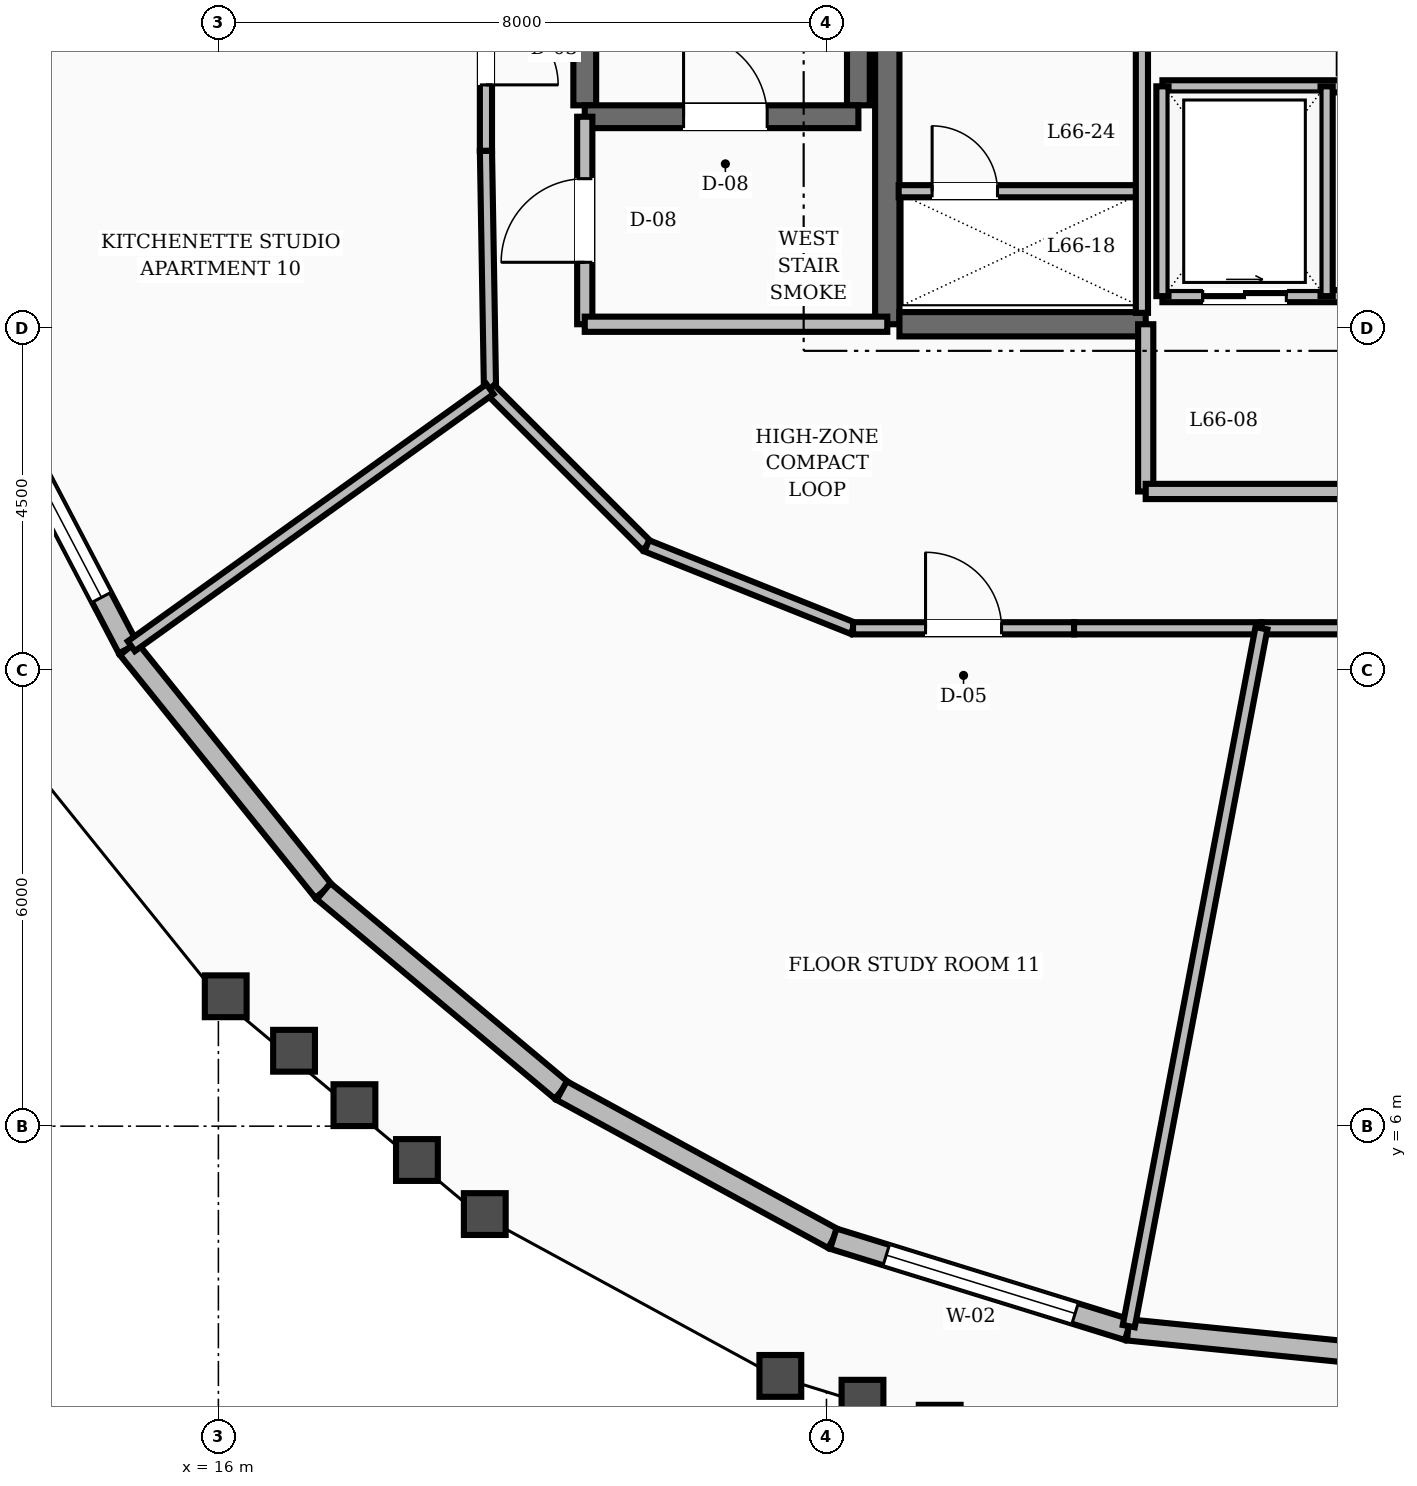
"""IFC4 building model, lengths in metres.
Left out: names, types, materials, properties, quantities, classifications, styles, units other than length and angle.
Written with IfcOpenShell. Run it as: python <this file> out.ifc"""

import sys

from ifc_helpers import new_model, si_unit, direction, frame, frame_2d, origin, place, context, subcontext, project, spatial, rectangle, extrude, element, fill, save


model = new_model("IFC4")
c1 = context("Model", 3, precision=1e-05, world=origin(), true_north=direction((0.0, 1.0)))
c2 = subcontext(c1, "Body", "Model", "MODEL_VIEW")
j1 = project(units=[si_unit("LENGTHUNIT", "METRE"), si_unit("PLANEANGLEUNIT", "RADIAN")], contexts=[c1])
p1 = place(None, origin())
s1 = spatial("IfcSite", under=j1, at=p1, CompositionType="ELEMENT")
p2 = place(p1, origin())
s2 = spatial("IfcBuilding", under=s1, at=p2, CompositionType="ELEMENT")
p3 = place(p2, frame((0.0, 0.0, 254.4)))
s3 = spatial("IfcBuildingStorey", under=s2, at=p3, CompositionType="ELEMENT", Elevation=254.4)
p4 = place(p3, frame((24.8, 16.55, 0.0), z_axis=(0.0, 0.0, 1.0), x_axis=(0.0, 1.0, 0.0)))
e1 = element("IfcWall", 1, at=p4, inside=s3, PredefinedType="SHEAR", context=c2, shape_type="SweptSolid", body=[
    extrude(rectangle(XDim=6.3, YDim=0.32, at=frame_2d((3.15, 0.0))), origin(), (0.0, 0.0, 1.0), 3.6),
])
p5 = place(p3, frame((24.96, 16.55, 0.0), z_axis=(0.0, 0.0, 1.0), x_axis=(1.0, 0.0, 0.0)))
e2 = element("IfcWall", 2, at=p5, inside=s3, PredefinedType="SHEAR", context=c2, shape_type="SweptSolid", body=[
    extrude(rectangle(XDim=3.24, YDim=0.32, at=frame_2d((1.62, 0.0))), origin(), (0.0, 0.0, 1.0), 3.6),
])
for number, where, z_axis, x_axis in (
    (3, (20.82, 19.43, 0.0), (0.0, 0.0, 1.0), (0.0, 1.0, 0.0)),
    (4, (24.42, 19.43, 0.0), (0.0, 0.0, 1.0), (0.0, 1.0, 0.0)),
):
    element("IfcWall", number, at=place(p3, frame(where, z_axis=z_axis, x_axis=x_axis)), inside=s3, PredefinedType="SHEAR", context=c2, shape_type="SweptSolid", body=[
        extrude(rectangle(XDim=8.74, YDim=0.3, at=frame_2d((4.37, 0.0))), origin(), (0.0, 0.0, 1.0), 3.6),
    ])
p6 = place(p3, frame((20.82, 19.28, 0.0), z_axis=(0.0, 0.0, 1.0), x_axis=(1.0, 0.0, 0.0)))
e5 = element("IfcWall", 5, at=p6, inside=s3, PredefinedType="SHEAR", context=c2, shape_type="SweptSolid", body=[
    extrude(rectangle(XDim=3.6, YDim=0.3, at=frame_2d((1.8, 0.0))), origin(), (0.0, 0.0, 1.0), 3.6),
])
p7 = place(p6, frame((1.3, 0.0, 0.0)))
e6 = element("IfcOpeningElement", 6, at=p7, cuts=e5, PredefinedType="OPENING", context=c2, shape_type="SweptSolid", body=[
    extrude(rectangle(XDim=1.1, YDim=2.1, at=frame_2d((0.55, 1.05))), frame((0.0, 0.16, 0.0), z_axis=(0.0, -1.0, 0.0), x_axis=(1.0, 0.0, 0.0)), (0.0, 0.0, 1.0), 0.32),
])
p8 = place(p3, frame((12.904, 15.931, 0.0), z_axis=(0.0, 0.0, 1.0), x_axis=(0.46412225373, -0.88577115193, 0.0)))
e7 = element("IfcWall", 7, at=p8, inside=s3, PredefinedType="STANDARD", context=c2, shape_type="SweptSolid", body=[
    extrude(rectangle(XDim=4.116, YDim=0.28, at=frame_2d((2.058, 0.0))), origin(), (0.0, 0.0, 1.0), 2.88),
])
p9 = place(p8, frame((0.758, 0.0, 0.8)))
e8 = element("IfcOpeningElement", 8, at=p9, cuts=e7, PredefinedType="OPENING", context=c2, shape_type="SweptSolid", body=[
    extrude(rectangle(XDim=2.6, YDim=1.65, at=frame_2d((1.3, 0.825))), frame((0.0, 0.15, 0.0), z_axis=(0.0, -1.0, 0.0), x_axis=(1.0, 0.0, 0.0)), (0.0, 0.0, 1.0), 0.3),
])
p10 = place(p3, frame((14.814, 12.285, 0.0), z_axis=(0.0, 0.0, 1.0), x_axis=(0.626849011523, -0.779140755418, 0.0)))
e9 = element("IfcWall", 9, at=p10, inside=s3, PredefinedType="STANDARD", context=c2, shape_type="SweptSolid", body=[
    extrude(rectangle(XDim=4.101, YDim=0.28, at=frame_2d((2.05, 0.0))), origin(), (0.0, 0.0, 1.0), 2.88),
])
p11 = place(p3, frame((17.385, 9.09, 0.0), z_axis=(0.0, 0.0, 1.0), x_axis=(0.766744674331, -0.64195218232, 0.0)))
e10 = element("IfcWall", 10, at=p11, inside=s3, PredefinedType="STANDARD", context=c2, shape_type="SweptSolid", body=[
    extrude(rectangle(XDim=4.085, YDim=0.28, at=frame_2d((2.042, 0.0))), origin(), (0.0, 0.0, 1.0), 2.88),
])
p12 = place(p3, frame((20.517, 6.468, 0.0), z_axis=(0.0, 0.0, 1.0), x_axis=(0.877966625542, -0.478721844534, 0.0)))
e11 = element("IfcWall", 11, at=p12, inside=s3, PredefinedType="STANDARD", context=c2, shape_type="SweptSolid", body=[
    extrude(rectangle(XDim=4.07, YDim=0.28, at=frame_2d((2.035, 0.0))), origin(), (0.0, 0.0, 1.0), 2.88),
])
p13 = place(p3, frame((24.09, 4.52, 0.0), z_axis=(0.0, 0.0, 1.0), x_axis=(0.955300452464, -0.295636678243, 0.0)))
e12 = element("IfcWall", 12, at=p13, inside=s3, PredefinedType="STANDARD", context=c2, shape_type="SweptSolid", body=[
    extrude(rectangle(XDim=4.059, YDim=0.28, at=frame_2d((2.029, 0.0))), origin(), (0.0, 0.0, 1.0), 2.88),
])
p14 = place(p13, frame((0.729, 0.0, 0.8)))
e13 = element("IfcOpeningElement", 13, at=p14, cuts=e12, PredefinedType="OPENING", context=c2, shape_type="SweptSolid", body=[
    extrude(rectangle(XDim=2.6, YDim=1.65, at=frame_2d((1.3, 0.825))), frame((0.0, 0.15, 0.0), z_axis=(0.0, -1.0, 0.0), x_axis=(1.0, 0.0, 0.0)), (0.0, 0.0, 1.0), 0.3),
])
p15 = place(p3, frame((27.968, 3.32, 0.0), z_axis=(0.0, 0.0, 1.0), x_axis=(0.994993554733, -0.099939111661, 0.0)))
e14 = element("IfcWall", 14, at=p15, inside=s3, PredefinedType="STANDARD", context=c2, shape_type="SweptSolid", body=[
    extrude(rectangle(XDim=4.053, YDim=0.28, at=frame_2d((2.026, 0.0))), origin(), (0.0, 0.0, 1.0), 2.88),
])
p16 = place(p3, frame((20.82, 16.55, 0.0), z_axis=(0.0, 0.0, 1.0), x_axis=(0.0, 1.0, 0.0)))
e15 = element("IfcWall", 15, at=p16, inside=s3, PredefinedType="SOLIDWALL", context=c2, shape_type="SweptSolid", body=[
    extrude(rectangle(XDim=2.73, YDim=0.2, at=frame_2d((1.365, 0.0))), origin(), (0.0, 0.0, 1.0), 2.87),
])
p17 = place(p16, frame((0.815, 0.0, 0.0)))
e16 = element("IfcOpeningElement", 16, at=p17, cuts=e15, PredefinedType="OPENING", context=c2, shape_type="SweptSolid", body=[
    extrude(rectangle(XDim=1.1, YDim=2.1, at=frame_2d((0.55, 1.05))), frame((0.0, 0.11, 0.0), z_axis=(0.0, -1.0, 0.0), x_axis=(1.0, 0.0, 0.0)), (0.0, 0.0, 1.0), 0.22),
])
p18 = place(p3, frame((20.82, 16.55, 0.0), z_axis=(0.0, 0.0, 1.0), x_axis=(1.0, 0.0, 0.0)))
e17 = element("IfcWall", 17, at=p18, inside=s3, PredefinedType="SOLIDWALL", context=c2, shape_type="SweptSolid", body=[
    extrude(rectangle(XDim=3.98, YDim=0.2, at=frame_2d((1.99, 0.0))), origin(), (0.0, 0.0, 1.0), 2.87),
])
p19 = place(p3, frame((28.2, 14.35, 0.0), z_axis=(0.0, 0.0, 1.0), x_axis=(0.0, 1.0, 0.0)))
e18 = element("IfcWall", 18, at=p19, inside=s3, PredefinedType="SOLIDWALL", context=c2, shape_type="SweptSolid", body=[
    extrude(rectangle(XDim=2.2, YDim=0.2, at=frame_2d((1.1, 0.0))), origin(), (0.0, 0.0, 1.0), 2.87),
])
p20 = place(p3, frame((28.2, 14.35, 0.0), z_axis=(0.0, 0.0, 1.0), x_axis=(1.0, 0.0, 0.0)))
e19 = element("IfcWall", 19, at=p20, inside=s3, PredefinedType="SOLIDWALL", context=c2, shape_type="SweptSolid", body=[
    extrude(rectangle(XDim=7.6, YDim=0.2, at=frame_2d((3.8, 0.0))), origin(), (0.0, 0.0, 1.0), 2.87),
])
p21 = place(p20, frame((3.2, 0.0, 0.0)))
e20 = element("IfcOpeningElement", 20, at=p21, cuts=e19, PredefinedType="OPENING", context=c2, shape_type="SweptSolid", body=[
    extrude(rectangle(XDim=1.2, YDim=2.1, at=frame_2d((0.6, 1.05))), frame((0.0, 0.11, 0.0), z_axis=(0.0, -1.0, 0.0), x_axis=(1.0, 0.0, 0.0)), (0.0, 0.0, 1.0), 0.22),
])
p22 = place(p3, frame((28.42, 16.92, 0.0), z_axis=(0.0, 0.0, 1.0), x_axis=(1.0, 0.0, 0.0)))
e21 = element("IfcWall", 21, at=p22, inside=s3, PredefinedType="SOLIDWALL", context=c2, shape_type="SweptSolid", body=[
    extrude(rectangle(XDim=7.16, YDim=0.16, at=frame_2d((3.58, 0.0))), origin(), (0.0, 0.0, 1.0), 2.87),
])
p23 = place(p22, frame((0.53, 0.0, 0.0)))
e22 = element("IfcOpeningElement", 22, at=p23, cuts=e21, PredefinedType="OPENING", context=c2, shape_type="SweptSolid", body=[
    extrude(rectangle(XDim=1.1, YDim=2.15, at=frame_2d((0.55, 1.075))), frame((0.0, 0.09, 0.0), z_axis=(0.0, -1.0, 0.0), x_axis=(1.0, 0.0, 0.0)), (0.0, 0.0, 1.0), 0.18),
])
p24 = place(p22, frame((3.03, 0.0, 0.0)))
e23 = element("IfcOpeningElement", 23, at=p24, cuts=e21, PredefinedType="OPENING", context=c2, shape_type="SweptSolid", body=[
    extrude(rectangle(XDim=1.1, YDim=2.15, at=frame_2d((0.55, 1.075))), frame((0.0, 0.09, 0.0), z_axis=(0.0, -1.0, 0.0), x_axis=(1.0, 0.0, 0.0)), (0.0, 0.0, 1.0), 0.18),
])
p25 = place(p22, frame((5.53, 0.0, 0.0)))
e24 = element("IfcOpeningElement", 24, at=p25, cuts=e21, PredefinedType="OPENING", context=c2, shape_type="SweptSolid", body=[
    extrude(rectangle(XDim=1.1, YDim=2.15, at=frame_2d((0.55, 1.075))), frame((0.0, 0.09, 0.0), z_axis=(0.0, -1.0, 0.0), x_axis=(1.0, 0.0, 0.0)), (0.0, 0.0, 1.0), 0.18),
])
p26 = place(p3, frame((28.42, 19.68, 0.0), z_axis=(0.0, 0.0, 1.0), x_axis=(1.0, 0.0, 0.0)))
e25 = element("IfcWall", 25, at=p26, inside=s3, PredefinedType="SOLIDWALL", context=c2, shape_type="SweptSolid", body=[
    extrude(rectangle(XDim=7.16, YDim=0.16, at=frame_2d((3.58, 0.0))), origin(), (0.0, 0.0, 1.0), 2.87),
])
for number, where, z_axis, x_axis in (
    (26, (28.42, 16.92, 0.0), (0.0, 0.0, 1.0), (0.0, 1.0, 0.0)),
    (27, (30.58, 16.92, 0.0), (0.0, 0.0, 1.0), (0.0, 1.0, 0.0)),
):
    element("IfcWall", number, at=place(p3, frame(where, z_axis=z_axis, x_axis=x_axis)), inside=s3, PredefinedType="SOLIDWALL", context=c2, shape_type="SweptSolid", body=[
        extrude(rectangle(XDim=2.76, YDim=0.16, at=frame_2d((1.38, 0.0))), origin(), (0.0, 0.0, 1.0), 2.87),
    ])
p27 = place(p3, frame((24.95, 18.3, 0.0), z_axis=(0.0, 0.0, 1.0), x_axis=(1.0, 0.0, 0.0)))
e28 = element("IfcWall", 28, at=p27, inside=s3, PredefinedType="SOLIDWALL", context=c2, shape_type="SweptSolid", body=[
    extrude(rectangle(XDim=3.2, YDim=0.16, at=frame_2d((1.6, 0.0))), origin(), (0.0, 0.0, 1.0), 2.87),
])
p28 = place(p27, frame((0.44, 0.0, 0.0)))
e29 = element("IfcOpeningElement", 29, at=p28, cuts=e28, PredefinedType="OPENING", context=c2, shape_type="SweptSolid", body=[
    extrude(rectangle(XDim=0.86, YDim=2.05, at=frame_2d((0.43, 1.025))), frame((0.0, 0.09, 0.0), z_axis=(0.0, -1.0, 0.0), x_axis=(1.0, 0.0, 0.0)), (0.0, 0.0, 1.0), 0.18),
])
p29 = place(p3, frame((28.15, 16.7, 0.0), z_axis=(0.0, 0.0, 1.0), x_axis=(0.0, 1.0, 0.0)))
e30 = element("IfcWall", 30, at=p29, inside=s3, PredefinedType="SOLIDWALL", context=c2, shape_type="SweptSolid", body=[
    extrude(rectangle(XDim=6.05, YDim=0.16, at=frame_2d((3.025, 0.0))), origin(), (0.0, 0.0, 1.0), 2.87),
])
p30 = place(p3, frame((19.52, 21.518, 0.0), z_axis=(0.0, 0.0, 1.0), x_axis=(0.0, -1.0, 0.0)))
e31 = element("IfcWall", 31, at=p30, inside=s3, PredefinedType="SOLIDWALL", context=c2, shape_type="SweptSolid", body=[
    extrude(rectangle(XDim=2.687, YDim=0.16, at=frame_2d((1.344, 0.0))), origin(), (0.0, 0.0, 1.0), 2.87),
])
p31 = place(p30, frame((0.868, 0.0, 0.0)))
e32 = element("IfcOpeningElement", 32, at=p31, cuts=e31, PredefinedType="OPENING", context=c2, shape_type="SweptSolid", body=[
    extrude(rectangle(XDim=0.95, YDim=2.1, at=frame_2d((0.475, 1.05))), frame((0.0, 0.09, 0.0), z_axis=(0.0, -1.0, 0.0), x_axis=(1.0, 0.0, 0.0)), (0.0, 0.0, 1.0), 0.18),
])
p32 = place(p3, frame((19.52, 18.831, 0.0), z_axis=(0.0, 0.0, 1.0), x_axis=(0.016981035134, -0.999855811828, 0.0)))
e33 = element("IfcWall", 33, at=p32, inside=s3, PredefinedType="SOLIDWALL", context=c2, shape_type="SweptSolid", body=[
    extrude(rectangle(XDim=3.134, YDim=0.16, at=frame_2d((1.567, 0.0))), origin(), (0.0, 0.0, 1.0), 2.87),
])
p33 = place(p3, frame((19.573, 15.697, 0.0), z_axis=(0.0, 0.0, 1.0), x_axis=(0.707106781187, -0.707106781187, 0.0)))
e34 = element("IfcWall", 34, at=p33, inside=s3, PredefinedType="SOLIDWALL", context=c2, shape_type="SweptSolid", body=[
    extrude(rectangle(XDim=2.916, YDim=0.16, at=frame_2d((1.458, 0.0))), origin(), (0.0, 0.0, 1.0), 2.87),
])
p34 = place(p3, frame((21.635, 13.635, 0.0), z_axis=(0.0, 0.0, 1.0), x_axis=(0.92856882165, -0.371160266542, 0.0)))
e35 = element("IfcWall", 35, at=p34, inside=s3, PredefinedType="SOLIDWALL", context=c2, shape_type="SweptSolid", body=[
    extrude(rectangle(XDim=2.923, YDim=0.16, at=frame_2d((1.461, 0.0))), origin(), (0.0, 0.0, 1.0), 2.87),
])
p35 = place(p3, frame((24.349, 12.55, 0.0), z_axis=(0.0, 0.0, 1.0), x_axis=(1.0, 0.0, 0.0)))
e36 = element("IfcWall", 36, at=p35, inside=s3, PredefinedType="SOLIDWALL", context=c2, shape_type="SweptSolid", body=[
    extrude(rectangle(XDim=2.908, YDim=0.16, at=frame_2d((1.454, 0.0))), origin(), (0.0, 0.0, 1.0), 2.87),
])
p36 = place(p35, frame((0.954, 0.0, 0.0)))
e37 = element("IfcOpeningElement", 37, at=p36, cuts=e36, PredefinedType="OPENING", context=c2, shape_type="SweptSolid", body=[
    extrude(rectangle(XDim=1.0, YDim=2.1, at=frame_2d((0.5, 1.05))), frame((0.0, 0.09, 0.0), z_axis=(0.0, -1.0, 0.0), x_axis=(1.0, 0.0, 0.0)), (0.0, 0.0, 1.0), 0.18),
])
p37 = place(p3, frame((27.257, 12.55, 0.0), z_axis=(0.0, 0.0, 1.0), x_axis=(1.0, 0.0, 0.0)))
e38 = element("IfcWall", 38, at=p37, inside=s3, PredefinedType="SOLIDWALL", context=c2, shape_type="SweptSolid", body=[
    extrude(rectangle(XDim=2.465, YDim=0.16, at=frame_2d((1.232, 0.0))), origin(), (0.0, 0.0, 1.0), 2.87),
])
p38 = place(p3, frame((29.722, 12.55, 0.0), z_axis=(0.0, 0.0, 1.0), x_axis=(1.0, 0.0, 0.0)))
e39 = element("IfcWall", 39, at=p38, inside=s3, PredefinedType="SOLIDWALL", context=c2, shape_type="SweptSolid", body=[
    extrude(rectangle(XDim=2.278, YDim=0.16, at=frame_2d((1.139, 0.0))), origin(), (0.0, 0.0, 1.0), 2.87),
])
p39 = place(p3, frame((19.573, 15.697, 0.0), z_axis=(0.0, 0.0, 1.0), x_axis=(-0.81279190608, -0.582554132602, 0.0)))
e40 = element("IfcWall", 40, at=p39, inside=s3, PredefinedType="SOLIDWALL", context=c2, shape_type="SweptSolid", body=[
    extrude(rectangle(XDim=5.806, YDim=0.16, at=frame_2d((2.903, 0.0))), origin(), (0.0, 0.0, 1.0), 2.87),
])
p40 = place(p3, frame((29.722, 12.55, 0.0), z_axis=(0.0, 0.0, 1.0), x_axis=(-0.186783181111, -0.982401162079, 0.0)))
e41 = element("IfcWall", 41, at=p40, inside=s3, PredefinedType="SOLIDWALL", context=c2, shape_type="SweptSolid", body=[
    extrude(rectangle(XDim=9.346, YDim=0.16, at=frame_2d((4.673, 0.0))), origin(), (0.0, 0.0, 1.0), 2.87),
])
p41 = place(p9, origin())
e42 = element("IfcWindow", 42, at=p41, inside=s3, PartitioningType="SINGLE_PANEL", PredefinedType="WINDOW", context=c2, shape_type="SweptSolid", body=[
    extrude(rectangle(XDim=2.6, YDim=1.65, at=frame_2d((1.3, 0.825))), frame((0.0, 0.03, 0.0), z_axis=(0.0, -1.0, 0.0), x_axis=(1.0, 0.0, 0.0)), (0.0, 0.0, 1.0), 0.06),
])
fill(e8, e42)
p42 = place(p14, origin())
e43 = element("IfcWindow", 43, at=p42, inside=s3, PartitioningType="SINGLE_PANEL", PredefinedType="WINDOW", context=c2, shape_type="SweptSolid", body=[
    extrude(rectangle(XDim=2.6, YDim=1.65, at=frame_2d((1.3, 0.825))), frame((0.0, 0.03, 0.0), z_axis=(0.0, -1.0, 0.0), x_axis=(1.0, 0.0, 0.0)), (0.0, 0.0, 1.0), 0.06),
])
fill(e13, e43)
p43 = place(p7, origin())
e44 = element("IfcDoor", 44, at=p43, inside=s3, OperationType="SINGLE_SWING_LEFT", PredefinedType="DOOR", context=c2, shape_type="SweptSolid", body=[
    extrude(rectangle(XDim=1.1, YDim=2.1, at=frame_2d((0.55, 1.05))), frame((0.0, 0.025, 0.0), z_axis=(0.0, -1.0, 0.0), x_axis=(1.0, 0.0, 0.0)), (0.0, 0.0, 1.0), 0.05),
])
fill(e6, e44)
p44 = place(p17, origin())
e45 = element("IfcDoor", 45, at=p44, inside=s3, OperationType="SINGLE_SWING_LEFT", PredefinedType="DOOR", context=c2, shape_type="SweptSolid", body=[
    extrude(rectangle(XDim=1.1, YDim=2.1, at=frame_2d((0.55, 1.05))), frame((0.0, 0.025, 0.0), z_axis=(0.0, -1.0, 0.0), x_axis=(1.0, 0.0, 0.0)), (0.0, 0.0, 1.0), 0.05),
])
fill(e16, e45)
p45 = place(p23, origin())
e46 = element("IfcDoor", 46, at=p45, inside=s3, OperationType="SLIDING_TO_RIGHT", PredefinedType="DOOR", context=c2, shape_type="SweptSolid", body=[
    extrude(rectangle(XDim=1.1, YDim=2.15, at=frame_2d((0.55, 1.075))), frame((0.0, 0.025, 0.0), z_axis=(0.0, -1.0, 0.0), x_axis=(1.0, 0.0, 0.0)), (0.0, 0.0, 1.0), 0.05),
])
fill(e22, e46)
p46 = place(p28, origin())
e47 = element("IfcDoor", 47, at=p46, inside=s3, OperationType="SINGLE_SWING_LEFT", PredefinedType="TRAPDOOR", context=c2, shape_type="SweptSolid", body=[
    extrude(rectangle(XDim=0.86, YDim=2.05, at=frame_2d((0.43, 1.025))), frame((0.0, 0.025, 0.0), z_axis=(0.0, -1.0, 0.0), x_axis=(1.0, 0.0, 0.0)), (0.0, 0.0, 1.0), 0.05),
])
fill(e29, e47)
p47 = place(p31, origin())
e48 = element("IfcDoor", 48, at=p47, inside=s3, OperationType="SINGLE_SWING_RIGHT", PredefinedType="DOOR", context=c2, shape_type="SweptSolid", body=[
    extrude(rectangle(XDim=0.95, YDim=2.1, at=frame_2d((0.475, 1.05))), frame((0.0, 0.025, 0.0), z_axis=(0.0, -1.0, 0.0), x_axis=(1.0, 0.0, 0.0)), (0.0, 0.0, 1.0), 0.05),
])
fill(e32, e48)
p48 = place(p36, origin())
e49 = element("IfcDoor", 49, at=p48, inside=s3, OperationType="SINGLE_SWING_LEFT", PredefinedType="DOOR", context=c2, shape_type="SweptSolid", body=[
    extrude(rectangle(XDim=1.0, YDim=2.1, at=frame_2d((0.5, 1.05))), frame((0.0, 0.025, 0.0), z_axis=(0.0, -1.0, 0.0), x_axis=(1.0, 0.0, 0.0)), (0.0, 0.0, 1.0), 0.05),
])
fill(e37, e49)
save(model, sys.argv[1])
